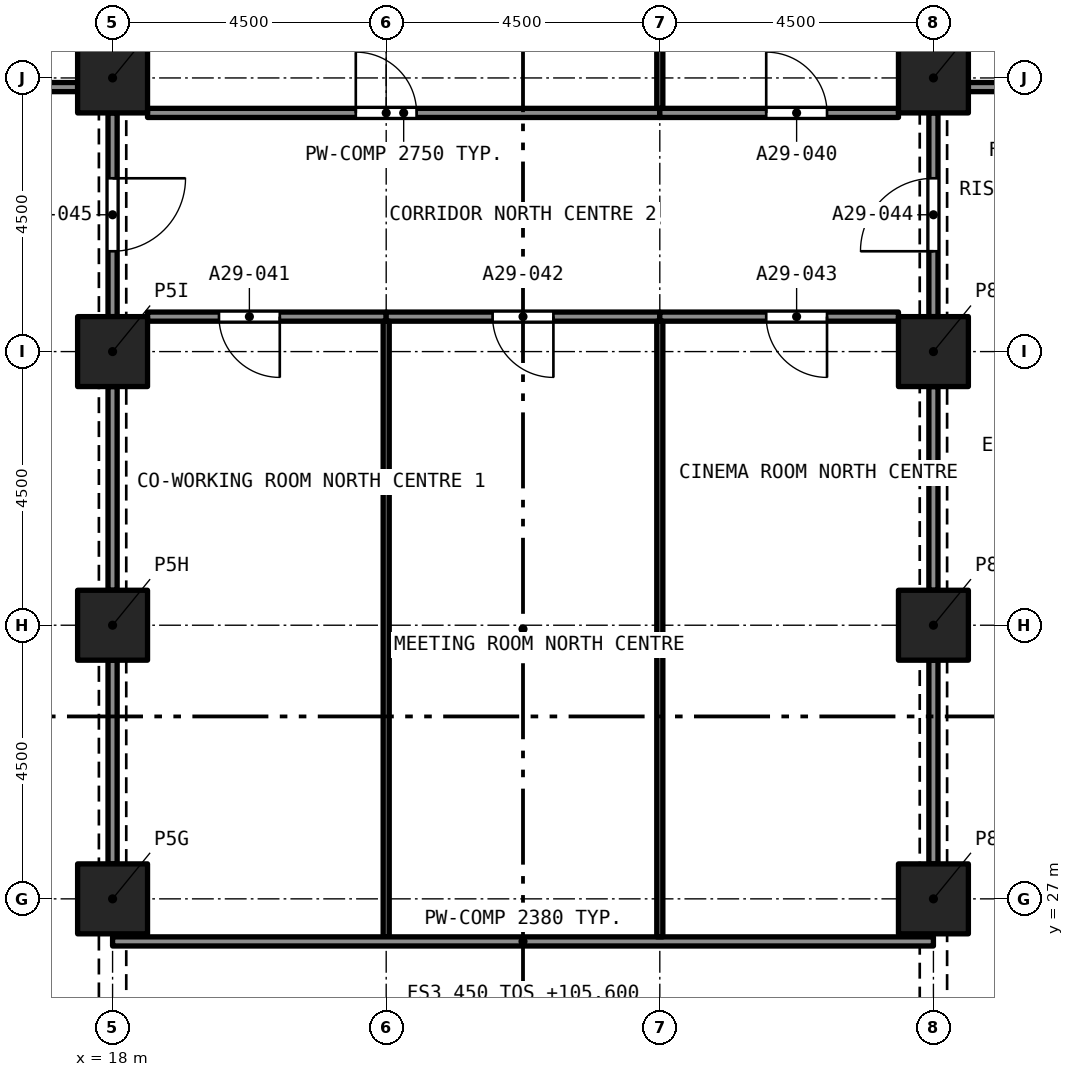
"""IFC4 building model, lengths in metres.
Left out: names, types, materials, properties, quantities, classifications, styles, units other than length and angle.
Written with IfcOpenShell. Run it as: python <this file> out.ifc"""

import sys

from ifc_helpers import new_model, si_unit, direction, frame, frame_2d, origin, origin_2d, place, context, subcontext, project, spatial, rectangle, extrude, element, fill, save


model = new_model("IFC4")
c1 = context("Model", 3, precision=1e-05, world=origin(), true_north=direction((0.0, 1.0)))
c2 = subcontext(c1, "Body", "Model", "MODEL_VIEW")
j1 = project(units=[si_unit("LENGTHUNIT", "METRE"), si_unit("PLANEANGLEUNIT", "RADIAN")], contexts=[c1])
p1 = place(None, origin())
s1 = spatial("IfcSite", under=j1, at=p1, CompositionType="ELEMENT")
p2 = place(p1, origin())
s2 = spatial("IfcBuilding", under=s1, at=p2, CompositionType="ELEMENT")
p3 = place(p2, frame((0.0, 0.0, 105.6)))
s3 = spatial("IfcBuildingStorey", under=s2, at=p3, CompositionType="ELEMENT", Elevation=105.6)
for number, where, z_axis, x_axis in (
    (1, (18.0, 27.0, 0.0), (0.0, 0.0, 1.0), (1.0, 0.0, 0.0)),
    (2, (31.5, 27.0, 0.0), (0.0, 0.0, 1.0), (1.0, 0.0, 0.0)),
    (3, (18.0, 31.5, 0.0), (0.0, 0.0, 1.0), (1.0, 0.0, 0.0)),
    (4, (31.5, 31.5, 0.0), (0.0, 0.0, 1.0), (1.0, 0.0, 0.0)),
    (5, (18.0, 36.0, 0.0), (0.0, 0.0, 1.0), (1.0, 0.0, 0.0)),
    (6, (31.5, 36.0, 0.0), (0.0, 0.0, 1.0), (1.0, 0.0, 0.0)),
    (7, (18.0, 40.5, 0.0), (0.0, 0.0, 1.0), (1.0, 0.0, 0.0)),
    (8, (31.5, 40.5, 0.0), (0.0, 0.0, 1.0), (1.0, 0.0, 0.0)),
):
    element("IfcColumn", number, at=place(p3, frame(where, z_axis=z_axis, x_axis=x_axis)), inside=s3, PredefinedType="COLUMN", context=c2, shape_type="SweptSolid", body=[
        extrude(rectangle(XDim=1.15, YDim=1.15, at=origin_2d()), origin(), (0.0, 0.0, 1.0), 3.2),
    ])
p4 = place(p3, frame((13.35, 40.35, 0.0), z_axis=(0.0, 0.0, 1.0), x_axis=(1.0, 0.0, 0.0)))
e9 = element("IfcWall", 9, at=p4, inside=s3, PredefinedType="PARTITIONING", context=c2, shape_type="SweptSolid", body=[
    extrude(rectangle(XDim=4.075, YDim=0.15, at=frame_2d((2.038, 0.0))), origin(), (0.0, 0.0, 1.0), 2.9),
])
p5 = place(p3, frame((32.075, 40.35, 0.0), z_axis=(0.0, 0.0, 1.0), x_axis=(1.0, 0.0, 0.0)))
e10 = element("IfcWall", 10, at=p5, inside=s3, PredefinedType="PARTITIONING", context=c2, shape_type="SweptSolid", body=[
    extrude(rectangle(XDim=2.275, YDim=0.15, at=frame_2d((1.138, 0.0))), origin(), (0.0, 0.0, 1.0), 2.9),
])
p6 = place(p5, frame((1.145, 0.0, 0.0)))
e11 = element("IfcOpeningElement", 11, at=p6, cuts=e10, PredefinedType="OPENING", context=c2, shape_type="SweptSolid", body=[
    extrude(rectangle(XDim=1.0, YDim=2.1, at=frame_2d((0.5, 1.05))), frame((0.0, 0.085, 0.0), z_axis=(0.0, -1.0, 0.0), x_axis=(1.0, 0.0, 0.0)), (0.0, 0.0, 1.0), 0.17),
])
p7 = place(p3, frame((18.575, 39.925, 0.0), z_axis=(0.0, 0.0, 1.0), x_axis=(1.0, 0.0, 0.0)))
e12 = element("IfcWall", 12, at=p7, inside=s3, PredefinedType="PARTITIONING", context=c2, shape_type="SweptSolid", body=[
    extrude(rectangle(XDim=8.425, YDim=0.15, at=frame_2d((4.212, 0.0))), origin(), (0.0, 0.0, 1.0), 2.75),
])
p8 = place(p7, frame((3.425, 0.0, 0.0)))
e13 = element("IfcOpeningElement", 13, at=p8, cuts=e12, PredefinedType="OPENING", context=c2, shape_type="SweptSolid", body=[
    extrude(rectangle(XDim=1.0, YDim=2.1, at=frame_2d((0.5, 1.05))), frame((0.0, 0.085, 0.0), z_axis=(0.0, -1.0, 0.0), x_axis=(1.0, 0.0, 0.0)), (0.0, 0.0, 1.0), 0.17),
])
p9 = place(p3, frame((27.0, 39.925, 0.0), z_axis=(0.0, 0.0, 1.0), x_axis=(1.0, 0.0, 0.0)))
e14 = element("IfcWall", 14, at=p9, inside=s3, PredefinedType="PARTITIONING", context=c2, shape_type="SweptSolid", body=[
    extrude(rectangle(XDim=3.925, YDim=0.15, at=frame_2d((1.962, 0.0))), origin(), (0.0, 0.0, 1.0), 2.75),
])
p10 = place(p9, frame((1.75, 0.0, 0.0)))
e15 = element("IfcOpeningElement", 15, at=p10, cuts=e14, PredefinedType="OPENING", context=c2, shape_type="SweptSolid", body=[
    extrude(rectangle(XDim=1.0, YDim=2.1, at=frame_2d((0.5, 1.05))), frame((0.0, 0.085, 0.0), z_axis=(0.0, -1.0, 0.0), x_axis=(1.0, 0.0, 0.0)), (0.0, 0.0, 1.0), 0.17),
])
p11 = place(p3, frame((22.5, 36.575, 0.0), z_axis=(0.0, 0.0, 1.0), x_axis=(-1.0, 0.0, 0.0)))
e16 = element("IfcWall", 16, at=p11, inside=s3, PredefinedType="PARTITIONING", context=c2, shape_type="SweptSolid", body=[
    extrude(rectangle(XDim=3.925, YDim=0.15, at=frame_2d((1.962, 0.0))), origin(), (0.0, 0.0, 1.0), 2.75),
])
p12 = place(p11, frame((1.75, 0.0, 0.0)))
e17 = element("IfcOpeningElement", 17, at=p12, cuts=e16, PredefinedType="OPENING", context=c2, shape_type="SweptSolid", body=[
    extrude(rectangle(XDim=1.0, YDim=2.1, at=frame_2d((0.5, 1.05))), frame((0.0, 0.085, 0.0), z_axis=(0.0, -1.0, 0.0), x_axis=(1.0, 0.0, 0.0)), (0.0, 0.0, 1.0), 0.17),
])
p13 = place(p3, frame((27.0, 36.575, 0.0), z_axis=(0.0, 0.0, 1.0), x_axis=(-1.0, 0.0, 0.0)))
e18 = element("IfcWall", 18, at=p13, inside=s3, PredefinedType="PARTITIONING", context=c2, shape_type="SweptSolid", body=[
    extrude(rectangle(XDim=4.5, YDim=0.15, at=frame_2d((2.25, 0.0))), origin(), (0.0, 0.0, 1.0), 2.75),
])
p14 = place(p13, frame((1.75, 0.0, 0.0)))
e19 = element("IfcOpeningElement", 19, at=p14, cuts=e18, PredefinedType="OPENING", context=c2, shape_type="SweptSolid", body=[
    extrude(rectangle(XDim=1.0, YDim=2.1, at=frame_2d((0.5, 1.05))), frame((0.0, 0.085, 0.0), z_axis=(0.0, -1.0, 0.0), x_axis=(1.0, 0.0, 0.0)), (0.0, 0.0, 1.0), 0.17),
])
p15 = place(p3, frame((30.925, 36.575, 0.0), z_axis=(0.0, 0.0, 1.0), x_axis=(-1.0, 0.0, 0.0)))
e20 = element("IfcWall", 20, at=p15, inside=s3, PredefinedType="PARTITIONING", context=c2, shape_type="SweptSolid", body=[
    extrude(rectangle(XDim=3.925, YDim=0.15, at=frame_2d((1.962, 0.0))), origin(), (0.0, 0.0, 1.0), 2.75),
])
p16 = place(p15, frame((1.175, 0.0, 0.0)))
e21 = element("IfcOpeningElement", 21, at=p16, cuts=e20, PredefinedType="OPENING", context=c2, shape_type="SweptSolid", body=[
    extrude(rectangle(XDim=1.0, YDim=2.1, at=frame_2d((0.5, 1.05))), frame((0.0, 0.085, 0.0), z_axis=(0.0, -1.0, 0.0), x_axis=(1.0, 0.0, 0.0)), (0.0, 0.0, 1.0), 0.17),
])
p17 = place(p3, frame((31.5, 36.575, 0.0), z_axis=(0.0, 0.0, 1.0), x_axis=(0.0, 1.0, 0.0)))
e22 = element("IfcWall", 22, at=p17, inside=s3, PredefinedType="PARTITIONING", context=c2, shape_type="SweptSolid", body=[
    extrude(rectangle(XDim=3.35, YDim=0.15, at=frame_2d((1.675, 0.0))), origin(), (0.0, 0.0, 1.0), 2.38),
])
p18 = place(p17, frame((1.075, 0.0, 0.0)))
e23 = element("IfcOpeningElement", 23, at=p18, cuts=e22, PredefinedType="OPENING", context=c2, shape_type="SweptSolid", body=[
    extrude(rectangle(XDim=1.2, YDim=2.1, at=frame_2d((0.6, 1.05))), frame((0.0, 0.085, 0.0), z_axis=(0.0, -1.0, 0.0), x_axis=(1.0, 0.0, 0.0)), (0.0, 0.0, 1.0), 0.17),
])
p19 = place(p3, frame((18.0, 39.925, 0.0), z_axis=(0.0, 0.0, 1.0), x_axis=(0.0, -1.0, 0.0)))
e24 = element("IfcWall", 24, at=p19, inside=s3, PredefinedType="PARTITIONING", context=c2, shape_type="SweptSolid", body=[
    extrude(rectangle(XDim=3.35, YDim=0.15, at=frame_2d((1.675, 0.0))), origin(), (0.0, 0.0, 1.0), 2.38),
])
p20 = place(p19, frame((1.075, 0.0, 0.0)))
e25 = element("IfcOpeningElement", 25, at=p20, cuts=e24, PredefinedType="OPENING", context=c2, shape_type="SweptSolid", body=[
    extrude(rectangle(XDim=1.2, YDim=2.1, at=frame_2d((0.6, 1.05))), frame((0.0, 0.085, 0.0), z_axis=(0.0, -1.0, 0.0), x_axis=(1.0, 0.0, 0.0)), (0.0, 0.0, 1.0), 0.17),
])
p21 = place(p3, frame((27.0, 40.0, 0.0), z_axis=(0.0, 0.0, 1.0), x_axis=(0.0, 1.0, 0.0)))
e26 = element("IfcWall", 26, at=p21, inside=s3, PredefinedType="PARTITIONING", context=c2, shape_type="SweptSolid", body=[
    extrude(rectangle(XDim=8.925, YDim=0.1, at=frame_2d((4.462, 0.0))), origin(), (0.0, 0.0, 1.0), 2.75),
])
p22 = place(p3, frame((22.5, 26.375, 0.0), z_axis=(0.0, 0.0, 1.0), x_axis=(0.0, 1.0, 0.0)))
e27 = element("IfcWall", 27, at=p22, inside=s3, PredefinedType="PARTITIONING", context=c2, shape_type="SweptSolid", body=[
    extrude(rectangle(XDim=10.125, YDim=0.1, at=frame_2d((5.062, 0.0))), origin(), (0.0, 0.0, 1.0), 2.75),
])
for number, where, z_axis, x_axis in (
    (28, (18.0, 27.575, 0.0), (0.0, 0.0, 1.0), (0.0, 1.0, 0.0)),
    (29, (18.0, 32.075, 0.0), (0.0, 0.0, 1.0), (0.0, 1.0, 0.0)),
):
    element("IfcWall", number, at=place(p3, frame(where, z_axis=z_axis, x_axis=x_axis)), inside=s3, PredefinedType="PARTITIONING", context=c2, shape_type="SweptSolid", body=[
        extrude(rectangle(XDim=3.35, YDim=0.15, at=frame_2d((1.675, 0.0))), origin(), (0.0, 0.0, 1.0), 2.38),
    ])
p23 = place(p3, frame((18.0, 26.3, 0.0), z_axis=(0.0, 0.0, 1.0), x_axis=(1.0, 0.0, 0.0)))
e30 = element("IfcWall", 30, at=p23, inside=s3, PredefinedType="PARTITIONING", context=c2, shape_type="SweptSolid", body=[
    extrude(rectangle(XDim=13.5, YDim=0.15, at=frame_2d((6.75, 0.0))), origin(), (0.0, 0.0, 1.0), 2.38),
])
p24 = place(p3, frame((27.0, 26.375, 0.0), z_axis=(0.0, 0.0, 1.0), x_axis=(0.0, 1.0, 0.0)))
e31 = element("IfcWall", 31, at=p24, inside=s3, PredefinedType="PARTITIONING", context=c2, shape_type="SweptSolid", body=[
    extrude(rectangle(XDim=10.125, YDim=0.1, at=frame_2d((5.062, 0.0))), origin(), (0.0, 0.0, 1.0), 2.75),
])
for number, where, z_axis, x_axis in (
    (32, (31.5, 32.075, 0.0), (0.0, 0.0, 1.0), (0.0, 1.0, 0.0)),
    (33, (31.5, 27.575, 0.0), (0.0, 0.0, 1.0), (0.0, 1.0, 0.0)),
):
    element("IfcWall", number, at=place(p3, frame(where, z_axis=z_axis, x_axis=x_axis)), inside=s3, PredefinedType="PARTITIONING", context=c2, shape_type="SweptSolid", body=[
        extrude(rectangle(XDim=3.35, YDim=0.15, at=frame_2d((1.675, 0.0))), origin(), (0.0, 0.0, 1.0), 2.38),
    ])
p25 = place(p8, origin())
e34 = element("IfcDoor", 34, at=p25, inside=s3, OperationType="SINGLE_SWING_LEFT", PredefinedType="DOOR", context=c2, shape_type="SweptSolid", body=[
    extrude(rectangle(XDim=1.0, YDim=2.1, at=frame_2d((0.5, 1.05))), frame((0.0, 0.025, 0.0), z_axis=(0.0, -1.0, 0.0), x_axis=(1.0, 0.0, 0.0)), (0.0, 0.0, 1.0), 0.05),
])
fill(e13, e34)
p26 = place(p10, origin())
e35 = element("IfcDoor", 35, at=p26, inside=s3, OperationType="SINGLE_SWING_RIGHT", PredefinedType="DOOR", context=c2, shape_type="SweptSolid", body=[
    extrude(rectangle(XDim=1.0, YDim=2.1, at=frame_2d((0.5, 1.05))), frame((0.0, 0.025, 0.0), z_axis=(0.0, -1.0, 0.0), x_axis=(1.0, 0.0, 0.0)), (0.0, 0.0, 1.0), 0.05),
])
fill(e15, e35)
p27 = place(p12, origin())
e36 = element("IfcDoor", 36, at=p27, inside=s3, OperationType="SINGLE_SWING_RIGHT", PredefinedType="DOOR", context=c2, shape_type="SweptSolid", body=[
    extrude(rectangle(XDim=1.0, YDim=2.1, at=frame_2d((0.5, 1.05))), frame((0.0, 0.025, 0.0), z_axis=(0.0, -1.0, 0.0), x_axis=(1.0, 0.0, 0.0)), (0.0, 0.0, 1.0), 0.05),
])
fill(e17, e36)
p28 = place(p14, origin())
e37 = element("IfcDoor", 37, at=p28, inside=s3, OperationType="SINGLE_SWING_RIGHT", PredefinedType="DOOR", context=c2, shape_type="SweptSolid", body=[
    extrude(rectangle(XDim=1.0, YDim=2.1, at=frame_2d((0.5, 1.05))), frame((0.0, 0.025, 0.0), z_axis=(0.0, -1.0, 0.0), x_axis=(1.0, 0.0, 0.0)), (0.0, 0.0, 1.0), 0.05),
])
fill(e19, e37)
p29 = place(p16, origin())
e38 = element("IfcDoor", 38, at=p29, inside=s3, OperationType="SINGLE_SWING_LEFT", PredefinedType="DOOR", context=c2, shape_type="SweptSolid", body=[
    extrude(rectangle(XDim=1.0, YDim=2.1, at=frame_2d((0.5, 1.05))), frame((0.0, 0.025, 0.0), z_axis=(0.0, -1.0, 0.0), x_axis=(1.0, 0.0, 0.0)), (0.0, 0.0, 1.0), 0.05),
])
fill(e21, e38)
p30 = place(p18, origin())
e39 = element("IfcDoor", 39, at=p30, inside=s3, OperationType="SINGLE_SWING_LEFT", PredefinedType="DOOR", context=c2, shape_type="SweptSolid", body=[
    extrude(rectangle(XDim=1.2, YDim=2.1, at=frame_2d((0.6, 1.05))), frame((0.0, 0.025, 0.0), z_axis=(0.0, -1.0, 0.0), x_axis=(1.0, 0.0, 0.0)), (0.0, 0.0, 1.0), 0.05),
])
fill(e23, e39)
p31 = place(p20, origin())
e40 = element("IfcDoor", 40, at=p31, inside=s3, OperationType="SINGLE_SWING_LEFT", PredefinedType="DOOR", context=c2, shape_type="SweptSolid", body=[
    extrude(rectangle(XDim=1.2, YDim=2.1, at=frame_2d((0.6, 1.05))), frame((0.0, 0.025, 0.0), z_axis=(0.0, -1.0, 0.0), x_axis=(1.0, 0.0, 0.0)), (0.0, 0.0, 1.0), 0.05),
])
fill(e25, e40)
save(model, sys.argv[1])
